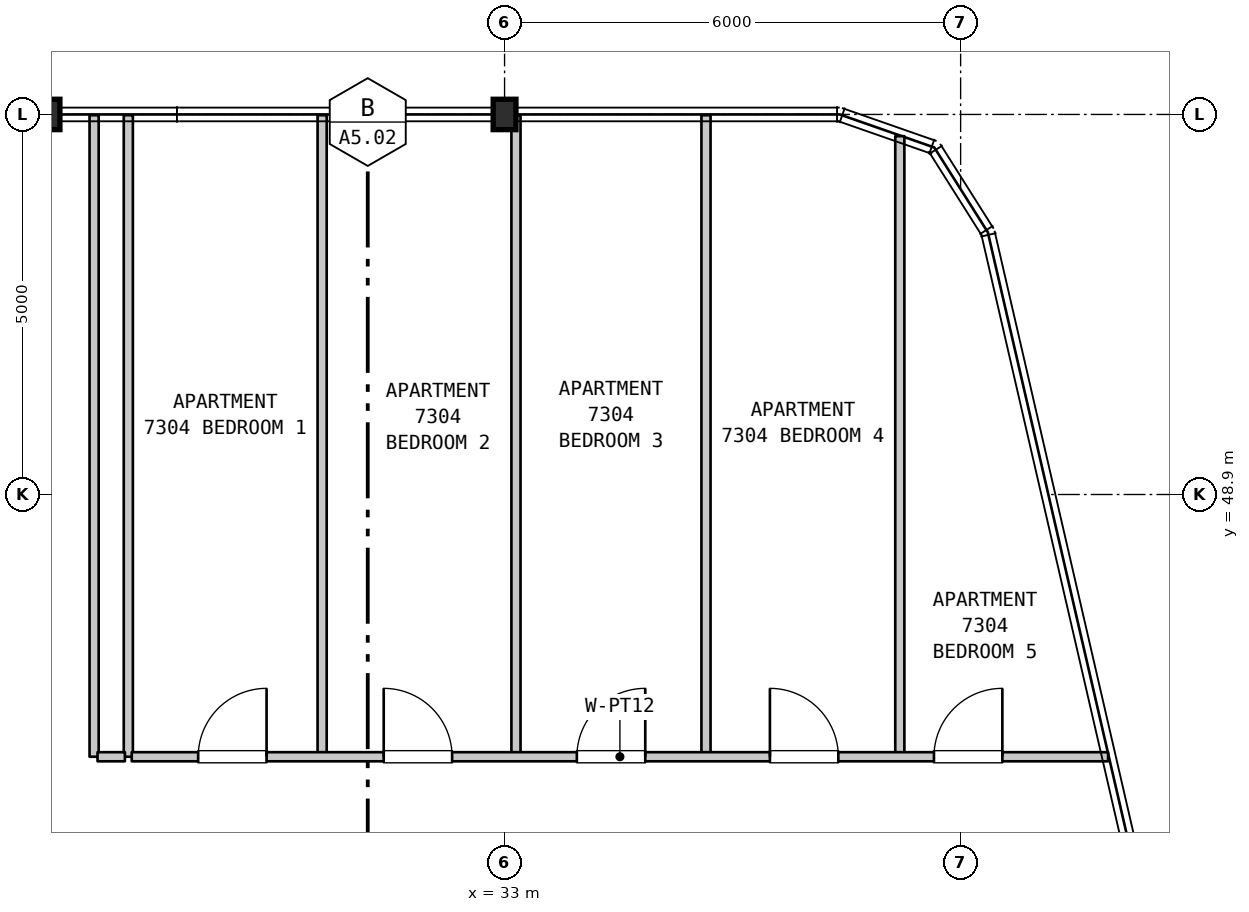
"""IFC4 building model, lengths in metres.
Left out: names, types, materials, properties, quantities, classifications, styles, units other than length and angle.
Written with IfcOpenShell. Run it as: python <this file> out.ifc"""

import sys

from ifc_helpers import new_model, si_unit, direction, frame, frame_2d, origin, origin_2d, place, context, subcontext, project, spatial, rectangle, i_section, extrude, element, fill, save


model = new_model("IFC4")
c1 = context("Model", 3, precision=1e-05, world=origin(), true_north=direction((0.0, 1.0)))
c2 = subcontext(c1, "Body", "Model", "MODEL_VIEW")
j1 = project(units=[si_unit("LENGTHUNIT", "METRE"), si_unit("PLANEANGLEUNIT", "RADIAN")], contexts=[c1])
p1 = place(None, origin())
s1 = spatial("IfcSite", under=j1, at=p1, CompositionType="ELEMENT")
p2 = place(p1, origin())
s2 = spatial("IfcBuilding", under=s1, at=p2, CompositionType="ELEMENT")
p3 = place(p2, frame((0.0, 0.0, 291.7)))
s3 = spatial("IfcBuildingStorey", under=s2, at=p3, CompositionType="ELEMENT", Elevation=291.7)
for number, where, z_axis, x_axis in (
    (1, (27.0, 53.9, 0.0), (0.0, 0.0, 1.0), (1.0, 0.0, 0.0)),
    (2, (33.0, 53.9, 0.0), (0.0, 0.0, 1.0), (1.0, 0.0, 0.0)),
):
    element("IfcColumn", number, at=place(p3, frame(where, z_axis=z_axis, x_axis=x_axis)), inside=s3, PredefinedType="COLUMN", context=c2, shape_type="SweptSolid", body=[
        extrude(i_section(OverallWidth=0.3, OverallDepth=0.4, WebThickness=0.013, FlangeThickness=0.024, FilletRadius=0.027, at=origin_2d()), origin(), (0.0, 0.0, 1.0), 3.7),
    ])
for number, where, z_axis, x_axis in (
    (3, (27.6, 45.45, 0.0), (0.0, 0.0, 1.0), (0.0, 1.0, 0.0)),
    (4, (28.05, 45.45, 0.0), (0.0, 0.0, 1.0), (0.0, 1.0, 0.0)),
    (5, (30.6, 45.45, 0.0), (0.0, 0.0, 1.0), (0.0, 1.0, 0.0)),
):
    element("IfcWall", number, at=place(p3, frame(where, z_axis=z_axis, x_axis=x_axis)), inside=s3, PredefinedType="PARTITIONING", context=c2, shape_type="SweptSolid", body=[
        extrude(rectangle(XDim=8.44, YDim=0.12, at=frame_2d((4.22, 0.0))), origin(), (0.0, 0.0, 1.0), 3.39),
    ])
p4 = place(p3, frame((33.15, 45.45, 0.0), z_axis=(0.0, 0.0, 1.0), x_axis=(0.0, 1.0, 0.0)))
e6 = element("IfcWall", 6, at=p4, inside=s3, PredefinedType="PARTITIONING", context=c2, shape_type="SweptSolid", body=[
    extrude(rectangle(XDim=8.44, YDim=0.12, at=frame_2d((4.22, 0.0))), origin(), (0.0, 0.0, 1.0), 2.79),
])
p5 = place(p3, frame((35.65, 45.45, 0.0), z_axis=(0.0, 0.0, 1.0), x_axis=(0.0, 1.0, 0.0)))
e7 = element("IfcWall", 7, at=p5, inside=s3, PredefinedType="PARTITIONING", context=c2, shape_type="SweptSolid", body=[
    extrude(rectangle(XDim=8.44, YDim=0.12, at=frame_2d((4.22, 0.0))), origin(), (0.0, 0.0, 1.0), 3.39),
])
p6 = place(p3, frame((38.2, 45.45, 0.0), z_axis=(0.0, 0.0, 1.0), x_axis=(0.0, 1.0, 0.0)))
e8 = element("IfcWall", 8, at=p6, inside=s3, PredefinedType="PARTITIONING", context=c2, shape_type="SweptSolid", body=[
    extrude(rectangle(XDim=8.164, YDim=0.12, at=frame_2d((4.082, 0.0))), origin(), (0.0, 0.0, 1.0), 3.39),
])
p7 = place(p3, frame((27.645, 45.45, 0.0), z_axis=(0.0, 0.0, 1.0), x_axis=(1.0, 0.0, 0.0)))
e9 = element("IfcWall", 9, at=p7, inside=s3, PredefinedType="PARTITIONING", context=c2, shape_type="SweptSolid", body=[
    extrude(rectangle(XDim=0.36, YDim=0.12, at=frame_2d((0.18, 0.0))), origin(), (0.0, 0.0, 1.0), 3.39),
])
p8 = place(p3, frame((28.095, 45.45, 0.0), z_axis=(0.0, 0.0, 1.0), x_axis=(1.0, 0.0, 0.0)))
e10 = element("IfcWall", 10, at=p8, inside=s3, PredefinedType="PARTITIONING", context=c2, shape_type="SweptSolid", body=[
    extrude(rectangle(XDim=12.845, YDim=0.12, at=frame_2d((6.422, 0.0))), origin(), (0.0, 0.0, 1.0), 3.39),
])
p9 = place(p8, frame((0.874, 0.0, 0.0)))
e11 = element("IfcOpeningElement", 11, at=p9, cuts=e10, PredefinedType="OPENING", context=c2, shape_type="SweptSolid", body=[
    extrude(rectangle(XDim=0.9, YDim=2.15, at=frame_2d((0.45, 1.075))), frame((0.0, 0.07, 0.0), z_axis=(0.0, -1.0, 0.0), x_axis=(1.0, 0.0, 0.0)), (0.0, 0.0, 1.0), 0.14),
])
p10 = place(p8, frame((3.315, 0.0, 0.0)))
e12 = element("IfcOpeningElement", 12, at=p10, cuts=e10, PredefinedType="OPENING", context=c2, shape_type="SweptSolid", body=[
    extrude(rectangle(XDim=0.9, YDim=2.15, at=frame_2d((0.45, 1.075))), frame((0.0, 0.07, 0.0), z_axis=(0.0, -1.0, 0.0), x_axis=(1.0, 0.0, 0.0)), (0.0, 0.0, 1.0), 0.14),
])
p11 = place(p8, frame((5.856, 0.0, 0.0)))
e13 = element("IfcOpeningElement", 13, at=p11, cuts=e10, PredefinedType="OPENING", context=c2, shape_type="SweptSolid", body=[
    extrude(rectangle(XDim=0.9, YDim=2.15, at=frame_2d((0.45, 1.075))), frame((0.0, 0.07, 0.0), z_axis=(0.0, -1.0, 0.0), x_axis=(1.0, 0.0, 0.0)), (0.0, 0.0, 1.0), 0.14),
])
p12 = place(p8, frame((8.396, 0.0, 0.0)))
e14 = element("IfcOpeningElement", 14, at=p12, cuts=e10, PredefinedType="OPENING", context=c2, shape_type="SweptSolid", body=[
    extrude(rectangle(XDim=0.9, YDim=2.15, at=frame_2d((0.45, 1.075))), frame((0.0, 0.07, 0.0), z_axis=(0.0, -1.0, 0.0), x_axis=(1.0, 0.0, 0.0)), (0.0, 0.0, 1.0), 0.14),
])
p13 = place(p8, frame((10.554, 0.0, 0.0)))
e15 = element("IfcOpeningElement", 15, at=p13, cuts=e10, PredefinedType="OPENING", context=c2, shape_type="SweptSolid", body=[
    extrude(rectangle(XDim=0.9, YDim=2.15, at=frame_2d((0.45, 1.075))), frame((0.0, 0.07, 0.0), z_axis=(0.0, -1.0, 0.0), x_axis=(1.0, 0.0, 0.0)), (0.0, 0.0, 1.0), 0.14),
])
p14 = place(p9, origin())
e16 = element("IfcDoor", 16, at=p14, inside=s3, OperationType="SINGLE_SWING_RIGHT", PredefinedType="DOOR", context=c2, shape_type="SweptSolid", body=[
    extrude(rectangle(XDim=0.9, YDim=2.15, at=frame_2d((0.45, 1.075))), frame((0.0, 0.025, 0.0), z_axis=(0.0, -1.0, 0.0), x_axis=(1.0, 0.0, 0.0)), (0.0, 0.0, 1.0), 0.05),
])
fill(e11, e16)
p15 = place(p10, origin())
e17 = element("IfcDoor", 17, at=p15, inside=s3, OperationType="SINGLE_SWING_LEFT", PredefinedType="DOOR", context=c2, shape_type="SweptSolid", body=[
    extrude(rectangle(XDim=0.9, YDim=2.15, at=frame_2d((0.45, 1.075))), frame((0.0, 0.025, 0.0), z_axis=(0.0, -1.0, 0.0), x_axis=(1.0, 0.0, 0.0)), (0.0, 0.0, 1.0), 0.05),
])
fill(e12, e17)
p16 = place(p11, origin())
e18 = element("IfcDoor", 18, at=p16, inside=s3, OperationType="SINGLE_SWING_RIGHT", PredefinedType="DOOR", context=c2, shape_type="SweptSolid", body=[
    extrude(rectangle(XDim=0.9, YDim=2.15, at=frame_2d((0.45, 1.075))), frame((0.0, 0.025, 0.0), z_axis=(0.0, -1.0, 0.0), x_axis=(1.0, 0.0, 0.0)), (0.0, 0.0, 1.0), 0.05),
])
fill(e13, e18)
p17 = place(p12, origin())
e19 = element("IfcDoor", 19, at=p17, inside=s3, OperationType="SINGLE_SWING_LEFT", PredefinedType="DOOR", context=c2, shape_type="SweptSolid", body=[
    extrude(rectangle(XDim=0.9, YDim=2.15, at=frame_2d((0.45, 1.075))), frame((0.0, 0.025, 0.0), z_axis=(0.0, -1.0, 0.0), x_axis=(1.0, 0.0, 0.0)), (0.0, 0.0, 1.0), 0.05),
])
fill(e14, e19)
p18 = place(p13, origin())
e20 = element("IfcDoor", 20, at=p18, inside=s3, OperationType="SINGLE_SWING_RIGHT", PredefinedType="DOOR", context=c2, shape_type="SweptSolid", body=[
    extrude(rectangle(XDim=0.9, YDim=2.15, at=frame_2d((0.45, 1.075))), frame((0.0, 0.025, 0.0), z_axis=(0.0, -1.0, 0.0), x_axis=(1.0, 0.0, 0.0)), (0.0, 0.0, 1.0), 0.05),
])
fill(e15, e20)
save(model, sys.argv[1])
